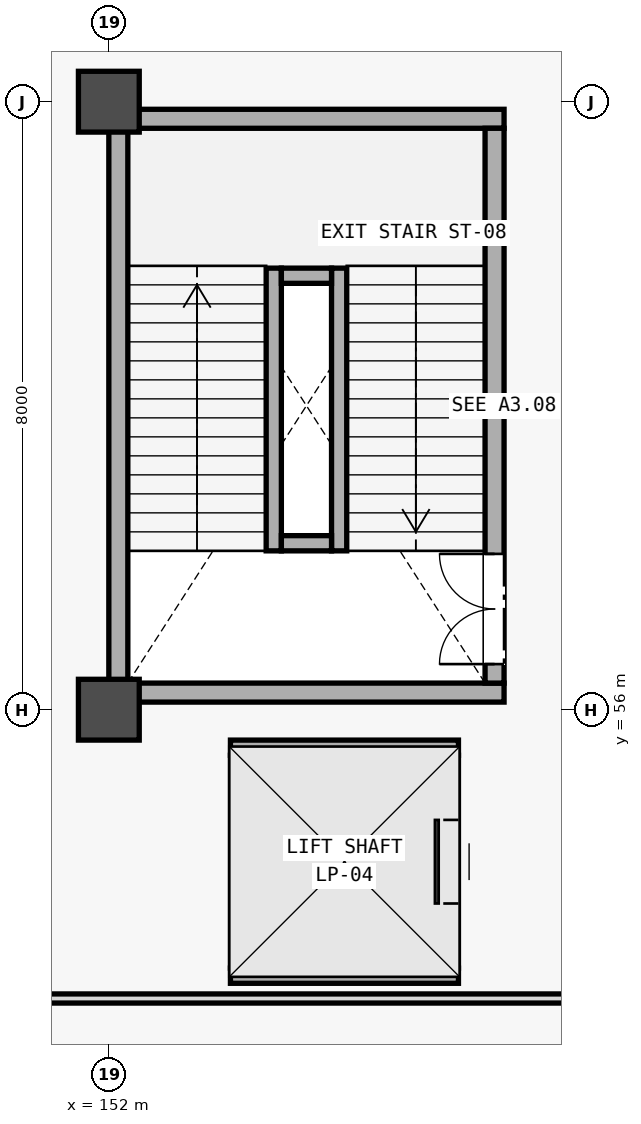
"""IFC4 building model, lengths in metres.
Left out: names, types, materials, properties, quantities, classifications, styles, units other than length and angle.
Written with IfcOpenShell. Run it as: python <this file> out.ifc"""

import sys

from ifc_helpers import new_model, si_unit, direction, frame, frame_2d, origin, origin_2d, place, context, subcontext, project, spatial, rectangle, extrude, element, fill, save


model = new_model("IFC4")
c1 = context("Model", 3, precision=1e-05, world=origin(), true_north=direction((0.0, 1.0)))
c2 = subcontext(c1, "Body", "Model", "MODEL_VIEW")
j1 = project(units=[si_unit("LENGTHUNIT", "METRE"), si_unit("PLANEANGLEUNIT", "RADIAN")], contexts=[c1])
p1 = place(None, origin())
s1 = spatial("IfcSite", under=j1, at=p1, CompositionType="ELEMENT")
p2 = place(p1, origin())
s2 = spatial("IfcBuilding", under=s1, at=p2, CompositionType="ELEMENT")
p3 = place(p2, origin())
s3 = spatial("IfcBuildingStorey", under=s2, at=p3, CompositionType="ELEMENT", Elevation=0.0)
for number, where, z_axis, x_axis in (
    (1, (152.0, 56.0, 0.0), (0.0, 0.0, 1.0), (1.0, 0.0, 0.0)),
    (2, (152.0, 64.0, 0.0), (0.0, 0.0, 1.0), (1.0, 0.0, 0.0)),
):
    element("IfcColumn", number, at=place(p3, frame(where, z_axis=z_axis, x_axis=x_axis)), inside=s3, PredefinedType="COLUMN", context=c2, shape_type="SweptSolid", body=[
        extrude(rectangle(XDim=0.8, YDim=0.8, at=origin_2d()), origin(), (0.0, 0.0, 1.0), 5.125),
    ])
for number, where, z_axis, x_axis in (
    (3, (152.0, 56.225, 0.0), (0.0, 0.0, 1.0), (1.0, 0.0, 0.0)),
    (4, (152.0, 63.775, 0.0), (0.0, 0.0, 1.0), (1.0, 0.0, 0.0)),
):
    element("IfcWall", number, at=place(p3, frame(where, z_axis=z_axis, x_axis=x_axis)), inside=s3, PredefinedType="SHEAR", context=c2, shape_type="SweptSolid", body=[
        extrude(rectangle(XDim=5.2, YDim=0.25, at=frame_2d((2.6, 0.0))), origin(), (0.0, 0.0, 1.0), 5.4),
    ])
p4 = place(p3, frame((152.125, 56.35, 0.0), z_axis=(0.0, 0.0, 1.0), x_axis=(0.0, 1.0, 0.0)))
e5 = element("IfcWall", 5, at=p4, inside=s3, PredefinedType="SHEAR", context=c2, shape_type="SweptSolid", body=[
    extrude(rectangle(XDim=7.3, YDim=0.25, at=frame_2d((3.65, 0.0))), origin(), (0.0, 0.0, 1.0), 5.4),
])
p5 = place(p3, frame((157.075, 56.35, 0.0), z_axis=(0.0, 0.0, 1.0), x_axis=(0.0, 1.0, 0.0)))
e6 = element("IfcWall", 6, at=p5, inside=s3, PredefinedType="SHEAR", context=c2, shape_type="SweptSolid", body=[
    extrude(rectangle(XDim=7.3, YDim=0.25, at=frame_2d((3.65, 0.0))), origin(), (0.0, 0.0, 1.0), 5.4),
])
p6 = place(p5, frame((0.25, 0.0, 0.0)))
e7 = element("IfcOpeningElement", 7, at=p6, cuts=e6, PredefinedType="OPENING", context=c2, shape_type="SweptSolid", body=[
    extrude(rectangle(XDim=1.45, YDim=2.2, at=frame_2d((0.725, 1.1))), frame((0.0, 0.135, 0.0), z_axis=(0.0, -1.0, 0.0), x_axis=(1.0, 0.0, 0.0)), (0.0, 0.0, 1.0), 0.27),
])
for number, where, z_axis, x_axis in (
    (8, (154.17, 58.09, 0.0), (0.0, 0.0, 1.0), (0.0, 1.0, 0.0)),
    (9, (155.03, 58.09, 0.0), (0.0, 0.0, 1.0), (0.0, 1.0, 0.0)),
):
    element("IfcWall", number, at=place(p3, frame(where, z_axis=z_axis, x_axis=x_axis)), inside=s3, PredefinedType="SHEAR", context=c2, shape_type="SweptSolid", body=[
        extrude(rectangle(XDim=3.72, YDim=0.2, at=frame_2d((1.86, 0.0))), origin(), (0.0, 0.0, 1.0), 5.4),
    ])
for number, where, z_axis, x_axis in (
    (10, (154.27, 58.19, 0.0), (0.0, 0.0, 1.0), (1.0, 0.0, 0.0)),
    (11, (154.27, 61.71, 0.0), (0.0, 0.0, 1.0), (1.0, 0.0, 0.0)),
):
    element("IfcWall", number, at=place(p3, frame(where, z_axis=z_axis, x_axis=x_axis)), inside=s3, PredefinedType="SHEAR", context=c2, shape_type="SweptSolid", body=[
        extrude(rectangle(XDim=0.66, YDim=0.2, at=frame_2d((0.33, 0.0))), origin(), (0.0, 0.0, 1.0), 5.4),
    ])
for number, where, z_axis, x_axis in (
    (12, (153.6, 52.5, 0.0), (0.0, 0.0, 1.0), (1.0, 0.0, 0.0)),
    (13, (153.6, 55.5, 0.0), (0.0, 0.0, 1.0), (1.0, 0.0, 0.0)),
):
    element("IfcWall", number, at=place(p3, frame(where, z_axis=z_axis, x_axis=x_axis)), inside=s3, PredefinedType="SHEAR", context=c2, shape_type="SweptSolid", body=[
        extrude(rectangle(XDim=3.0, YDim=0.2, at=frame_2d((1.5, 0.0))), origin(), (0.0, 0.0, 1.0), 5.4),
    ])
p7 = place(p3, frame((153.7, 52.6, 0.0), z_axis=(0.0, 0.0, 1.0), x_axis=(0.0, 1.0, 0.0)))
e14 = element("IfcWall", 14, at=p7, inside=s3, PredefinedType="SHEAR", context=c2, shape_type="SweptSolid", body=[
    extrude(rectangle(XDim=2.8, YDim=0.2, at=frame_2d((1.4, 0.0))), origin(), (0.0, 0.0, 1.0), 5.4),
])
p8 = place(p3, frame((156.5, 52.6, 0.0), z_axis=(0.0, 0.0, 1.0), x_axis=(0.0, 1.0, 0.0)))
e15 = element("IfcWall", 15, at=p8, inside=s3, PredefinedType="SHEAR", context=c2, shape_type="SweptSolid", body=[
    extrude(rectangle(XDim=2.8, YDim=0.2, at=frame_2d((1.4, 0.0))), origin(), (0.0, 0.0, 1.0), 5.4),
])
p9 = place(p8, frame((0.85, 0.0, 0.0)))
e16 = element("IfcOpeningElement", 16, at=p9, cuts=e15, PredefinedType="OPENING", context=c2, shape_type="SweptSolid", body=[
    extrude(rectangle(XDim=1.1, YDim=2.2, at=frame_2d((0.55, 1.1))), frame((0.0, 0.11, 0.0), z_axis=(0.0, -1.0, 0.0), x_axis=(1.0, 0.0, 0.0)), (0.0, 0.0, 1.0), 0.22),
])
p10 = place(p3, frame((144.15, 52.2, 0.0), z_axis=(0.0, 0.0, 1.0), x_axis=(1.0, 0.0, 0.0)))
e17 = element("IfcWall", 17, at=p10, inside=s3, PredefinedType="PARTITIONING", context=c2, shape_type="SweptSolid", body=[
    extrude(rectangle(XDim=17.85, YDim=0.12, at=frame_2d((8.925, 0.0))), origin(), (0.0, 0.0, 1.0), 4.405),
])
p11 = place(p6, origin())
e18 = element("IfcDoor", 18, at=p11, inside=s3, OperationType="DOUBLE_DOOR_SINGLE_SWING", PredefinedType="DOOR", context=c2, shape_type="SweptSolid", body=[
    extrude(rectangle(XDim=1.45, YDim=2.2, at=frame_2d((0.725, 1.1))), frame((0.0, 0.025, 0.0), z_axis=(0.0, -1.0, 0.0), x_axis=(1.0, 0.0, 0.0)), (0.0, 0.0, 1.0), 0.05),
])
fill(e7, e18)
p12 = place(p9, origin())
e19 = element("IfcDoor", 19, at=p12, inside=s3, OperationType="SLIDING_TO_LEFT", PredefinedType="DOOR", context=c2, shape_type="SweptSolid", body=[
    extrude(rectangle(XDim=1.1, YDim=2.2, at=frame_2d((0.55, 1.1))), frame((0.0, 0.025, 0.0), z_axis=(0.0, -1.0, 0.0), x_axis=(1.0, 0.0, 0.0)), (0.0, 0.0, 1.0), 0.05),
])
fill(e16, e19)
save(model, sys.argv[1])
